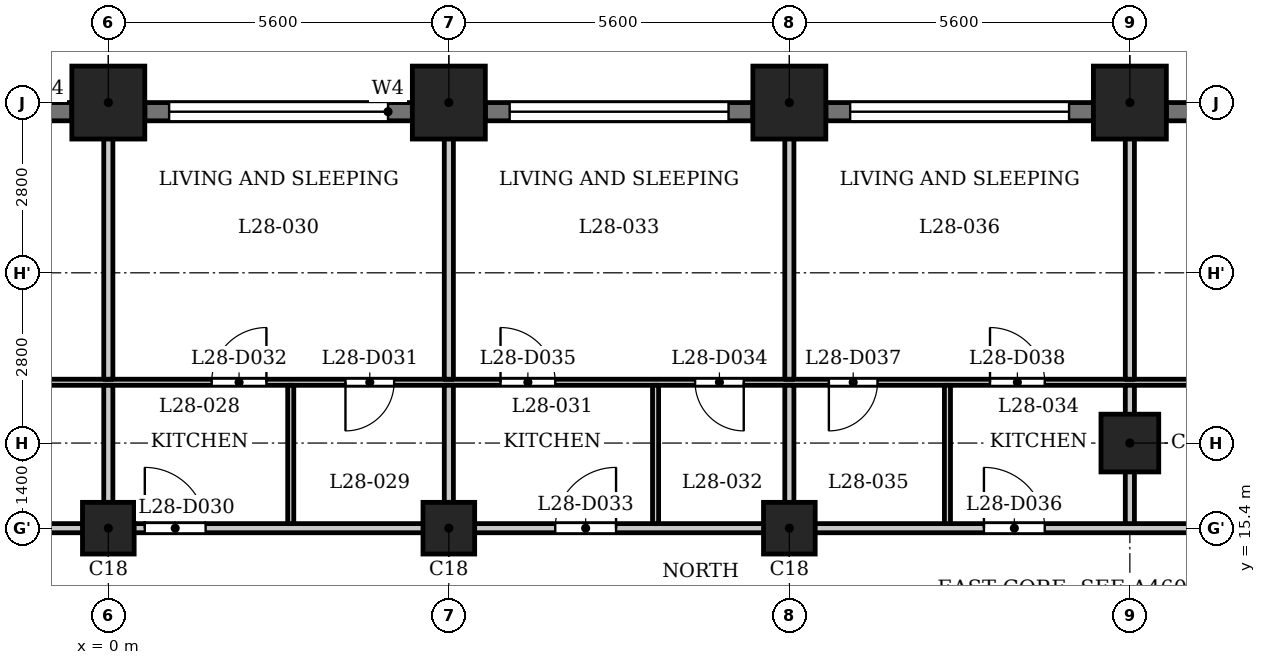
"""IFC4 building model, lengths in metres.
Left out: names, types, materials, properties, quantities, classifications, styles, units other than length and angle.
Written with IfcOpenShell. Run it as: python <this file> out.ifc"""

import sys

from ifc_helpers import new_model, si_unit, direction, frame, frame_2d, origin, origin_2d, place, context, subcontext, project, spatial, rectangle, extrude, element, fill, save


model = new_model("IFC4")
c1 = context("Model", 3, precision=1e-05, world=origin(), true_north=direction((0.0, 1.0)))
c2 = subcontext(c1, "Body", "Model", "MODEL_VIEW")
j1 = project(units=[si_unit("LENGTHUNIT", "METRE"), si_unit("PLANEANGLEUNIT", "RADIAN")], contexts=[c1])
p1 = place(None, origin())
s1 = spatial("IfcSite", under=j1, at=p1, CompositionType="ELEMENT")
p2 = place(p1, origin())
s2 = spatial("IfcBuilding", under=s1, at=p2, CompositionType="ELEMENT")
p3 = place(p2, frame((0.0, 0.0, 111.3)))
s3 = spatial("IfcBuildingStorey", under=s2, at=p3, CompositionType="ELEMENT", Elevation=111.3)
for number, where, z_axis, x_axis in (
    (1, (16.8, 22.4, 0.0), (0.0, 0.0, 1.0), (1.0, 0.0, 0.0)),
    (2, (11.2, 22.4, 0.0), (0.0, 0.0, 1.0), (1.0, 0.0, 0.0)),
    (3, (5.6, 22.4, 0.0), (0.0, 0.0, 1.0), (1.0, 0.0, 0.0)),
    (4, (0.0, 22.4, 0.0), (0.0, 0.0, 1.0), (1.0, 0.0, 0.0)),
):
    element("IfcColumn", number, at=place(p3, frame(where, z_axis=z_axis, x_axis=x_axis)), inside=s3, PredefinedType="COLUMN", context=c2, shape_type="SweptSolid", body=[
        extrude(rectangle(XDim=1.2, YDim=1.2, at=origin_2d()), origin(), (0.0, 0.0, 1.0), 3.5),
    ])
p4 = place(p3, frame((16.8, 16.8, 0.0), z_axis=(0.0, 0.0, 1.0), x_axis=(1.0, 0.0, 0.0)))
e5 = element("IfcColumn", 5, at=p4, inside=s3, PredefinedType="COLUMN", context=c2, shape_type="SweptSolid", body=[
    extrude(rectangle(XDim=0.95, YDim=0.95, at=origin_2d()), origin(), (0.0, 0.0, 1.0), 3.5),
])
for number, where, z_axis, x_axis in (
    (6, (0.0, 15.4, 0.0), (0.0, 0.0, 1.0), (1.0, 0.0, 0.0)),
    (7, (5.6, 15.4, 0.0), (0.0, 0.0, 1.0), (1.0, 0.0, 0.0)),
    (8, (11.2, 15.4, 0.0), (0.0, 0.0, 1.0), (1.0, 0.0, 0.0)),
):
    element("IfcColumn", number, at=place(p3, frame(where, z_axis=z_axis, x_axis=x_axis)), inside=s3, PredefinedType="COLUMN", context=c2, shape_type="SweptSolid", body=[
        extrude(rectangle(XDim=0.85, YDim=0.85, at=origin_2d()), origin(), (0.0, 0.0, 1.0), 3.5),
    ])
p5 = place(p3, frame((20.0, 22.25, 0.0), z_axis=(0.0, 0.0, 1.0), x_axis=(-1.0, 0.0, 0.0)))
e9 = element("IfcWall", 9, at=p5, inside=s3, PredefinedType="SOLIDWALL", context=c2, shape_type="SweptSolid", body=[
    extrude(rectangle(XDim=2.6, YDim=0.3, at=frame_2d((1.3, 0.0))), origin(), (0.0, 0.0, 1.0), 2.4),
])
p6 = place(p5, frame((0.7, 0.0, 0.6)))
e10 = element("IfcOpeningElement", 10, at=p6, cuts=e9, PredefinedType="OPENING", context=c2, shape_type="SweptSolid", body=[
    extrude(rectangle(XDim=1.2, YDim=1.55, at=frame_2d((0.6, 0.775))), frame((0.0, 0.16, 0.0), z_axis=(0.0, -1.0, 0.0), x_axis=(1.0, 0.0, 0.0)), (0.0, 0.0, 1.0), 0.32),
])
p7 = place(p3, frame((16.2, 22.25, 0.0), z_axis=(0.0, 0.0, 1.0), x_axis=(-1.0, 0.0, 0.0)))
e11 = element("IfcWall", 11, at=p7, inside=s3, PredefinedType="SOLIDWALL", context=c2, shape_type="SweptSolid", body=[
    extrude(rectangle(XDim=4.4, YDim=0.3, at=frame_2d((2.2, 0.0))), origin(), (0.0, 0.0, 1.0), 2.4),
])
p8 = place(p7, frame((0.4, 0.0, 1.2)))
e12 = element("IfcOpeningElement", 12, at=p8, cuts=e11, PredefinedType="OPENING", context=c2, shape_type="SweptSolid", body=[
    extrude(rectangle(XDim=3.6, YDim=0.95, at=frame_2d((1.8, 0.475))), frame((0.0, 0.16, 0.0), z_axis=(0.0, -1.0, 0.0), x_axis=(1.0, 0.0, 0.0)), (0.0, 0.0, 1.0), 0.32),
])
p9 = place(p3, frame((10.6, 22.25, 0.0), z_axis=(0.0, 0.0, 1.0), x_axis=(-1.0, 0.0, 0.0)))
e13 = element("IfcWall", 13, at=p9, inside=s3, PredefinedType="SOLIDWALL", context=c2, shape_type="SweptSolid", body=[
    extrude(rectangle(XDim=4.4, YDim=0.3, at=frame_2d((2.2, 0.0))), origin(), (0.0, 0.0, 1.0), 2.4),
])
p10 = place(p9, frame((0.4, 0.0, 1.2)))
e14 = element("IfcOpeningElement", 14, at=p10, cuts=e13, PredefinedType="OPENING", context=c2, shape_type="SweptSolid", body=[
    extrude(rectangle(XDim=3.6, YDim=0.95, at=frame_2d((1.8, 0.475))), frame((0.0, 0.16, 0.0), z_axis=(0.0, -1.0, 0.0), x_axis=(1.0, 0.0, 0.0)), (0.0, 0.0, 1.0), 0.32),
])
p11 = place(p3, frame((5.0, 22.25, 0.0), z_axis=(0.0, 0.0, 1.0), x_axis=(-1.0, 0.0, 0.0)))
e15 = element("IfcWall", 15, at=p11, inside=s3, PredefinedType="SOLIDWALL", context=c2, shape_type="SweptSolid", body=[
    extrude(rectangle(XDim=4.4, YDim=0.3, at=frame_2d((2.2, 0.0))), origin(), (0.0, 0.0, 1.0), 2.4),
])
p12 = place(p11, frame((0.4, 0.0, 1.2)))
e16 = element("IfcOpeningElement", 16, at=p12, cuts=e15, PredefinedType="OPENING", context=c2, shape_type="SweptSolid", body=[
    extrude(rectangle(XDim=3.6, YDim=0.95, at=frame_2d((1.8, 0.475))), frame((0.0, 0.16, 0.0), z_axis=(0.0, -1.0, 0.0), x_axis=(1.0, 0.0, 0.0)), (0.0, 0.0, 1.0), 0.32),
])
p13 = place(p3, frame((-0.6, 22.25, 0.0), z_axis=(0.0, 0.0, 1.0), x_axis=(-1.0, 0.0, 0.0)))
e17 = element("IfcWall", 17, at=p13, inside=s3, PredefinedType="SOLIDWALL", context=c2, shape_type="SweptSolid", body=[
    extrude(rectangle(XDim=4.4, YDim=0.3, at=frame_2d((2.2, 0.0))), origin(), (0.0, 0.0, 1.0), 2.4),
])
p14 = place(p13, frame((0.4, 0.0, 1.2)))
e18 = element("IfcOpeningElement", 18, at=p14, cuts=e17, PredefinedType="OPENING", context=c2, shape_type="SweptSolid", body=[
    extrude(rectangle(XDim=3.6, YDim=0.95, at=frame_2d((1.8, 0.475))), frame((0.0, 0.16, 0.0), z_axis=(0.0, -1.0, 0.0), x_axis=(1.0, 0.0, 0.0)), (0.0, 0.0, 1.0), 0.32),
])
p15 = place(p3, frame((-27.484, 15.4, 0.0), z_axis=(0.0, 0.0, 1.0), x_axis=(1.0, 0.0, 0.0)))
e19 = element("IfcWall", 19, at=p15, inside=s3, PredefinedType="PARTITIONING", context=c2, shape_type="SweptSolid", body=[
    extrude(rectangle(XDim=54.968, YDim=0.15, at=frame_2d((27.484, 0.0))), origin(), (0.0, 0.0, 1.0), 3.2),
])
p16 = place(p15, frame((9.034, 0.0, 0.0)))
e20 = element("IfcOpeningElement", 20, at=p16, cuts=e19, PredefinedType="OPENING", context=c2, shape_type="SweptSolid", body=[
    extrude(rectangle(XDim=1.0, YDim=2.1, at=frame_2d((0.5, 1.05))), frame((0.0, 0.085, 0.0), z_axis=(0.0, -1.0, 0.0), x_axis=(1.0, 0.0, 0.0)), (0.0, 0.0, 1.0), 0.17),
])
p17 = place(p15, frame((14.634, 0.0, 0.0)))
e21 = element("IfcOpeningElement", 21, at=p17, cuts=e19, PredefinedType="OPENING", context=c2, shape_type="SweptSolid", body=[
    extrude(rectangle(XDim=1.0, YDim=2.1, at=frame_2d((0.5, 1.05))), frame((0.0, 0.085, 0.0), z_axis=(0.0, -1.0, 0.0), x_axis=(1.0, 0.0, 0.0)), (0.0, 0.0, 1.0), 0.17),
])
p18 = place(p15, frame((16.984, 0.0, 0.0)))
e22 = element("IfcOpeningElement", 22, at=p18, cuts=e19, PredefinedType="OPENING", context=c2, shape_type="SweptSolid", body=[
    extrude(rectangle(XDim=1.0, YDim=2.1, at=frame_2d((0.5, 1.05))), frame((0.0, 0.085, 0.0), z_axis=(0.0, -1.0, 0.0), x_axis=(1.0, 0.0, 0.0)), (0.0, 0.0, 1.0), 0.17),
])
p19 = place(p15, frame((28.084, 0.0, 0.0)))
e23 = element("IfcOpeningElement", 23, at=p19, cuts=e19, PredefinedType="OPENING", context=c2, shape_type="SweptSolid", body=[
    extrude(rectangle(XDim=1.0, YDim=2.1, at=frame_2d((0.5, 1.05))), frame((0.0, 0.085, 0.0), z_axis=(0.0, -1.0, 0.0), x_axis=(1.0, 0.0, 0.0)), (0.0, 0.0, 1.0), 0.17),
])
p20 = place(p15, frame((34.834, 0.0, 0.0)))
e24 = element("IfcOpeningElement", 24, at=p20, cuts=e19, PredefinedType="OPENING", context=c2, shape_type="SweptSolid", body=[
    extrude(rectangle(XDim=1.0, YDim=2.1, at=frame_2d((0.5, 1.05))), frame((0.0, 0.085, 0.0), z_axis=(0.0, -1.0, 0.0), x_axis=(1.0, 0.0, 0.0)), (0.0, 0.0, 1.0), 0.17),
])
p21 = place(p15, frame((41.884, 0.0, 0.0)))
e25 = element("IfcOpeningElement", 25, at=p21, cuts=e19, PredefinedType="OPENING", context=c2, shape_type="SweptSolid", body=[
    extrude(rectangle(XDim=1.0, YDim=2.1, at=frame_2d((0.5, 1.05))), frame((0.0, 0.085, 0.0), z_axis=(0.0, -1.0, 0.0), x_axis=(1.0, 0.0, 0.0)), (0.0, 0.0, 1.0), 0.17),
])
p22 = place(p15, frame((48.234, 0.0, 0.0)))
e26 = element("IfcOpeningElement", 26, at=p22, cuts=e19, PredefinedType="OPENING", context=c2, shape_type="SweptSolid", body=[
    extrude(rectangle(XDim=1.0, YDim=2.1, at=frame_2d((0.5, 1.05))), frame((0.0, 0.085, 0.0), z_axis=(0.0, -1.0, 0.0), x_axis=(1.0, 0.0, 0.0)), (0.0, 0.0, 1.0), 0.17),
])
p23 = place(p3, frame((-26.465, 17.8, 0.0), z_axis=(0.0, 0.0, 1.0), x_axis=(1.0, 0.0, 0.0)))
e27 = element("IfcWall", 27, at=p23, inside=s3, PredefinedType="PARTITIONING", context=c2, shape_type="SweptSolid", body=[
    extrude(rectangle(XDim=52.859, YDim=0.1, at=frame_2d((26.43, 0.0))), origin(), (0.0, 0.0, 1.0), 3.2),
])
p24 = place(p23, frame((2.697, 0.0, 0.0)))
e28 = element("IfcOpeningElement", 28, at=p24, cuts=e27, PredefinedType="OPENING", context=c2, shape_type="SweptSolid", body=[
    extrude(rectangle(XDim=0.8, YDim=2.1, at=frame_2d((0.4, 1.05))), frame((0.0, 0.06, 0.0), z_axis=(0.0, -1.0, 0.0), x_axis=(1.0, 0.0, 0.0)), (0.0, 0.0, 1.0), 0.12),
])
p25 = place(p23, frame((7.115, 0.0, 0.0)))
e29 = element("IfcOpeningElement", 29, at=p25, cuts=e27, PredefinedType="OPENING", context=c2, shape_type="SweptSolid", body=[
    extrude(rectangle(XDim=0.9, YDim=2.1, at=frame_2d((0.45, 1.05))), frame((0.0, 0.06, 0.0), z_axis=(0.0, -1.0, 0.0), x_axis=(1.0, 0.0, 0.0)), (0.0, 0.0, 1.0), 0.12),
])
p26 = place(p23, frame((10.315, 0.0, 0.0)))
e30 = element("IfcOpeningElement", 30, at=p26, cuts=e27, PredefinedType="OPENING", context=c2, shape_type="SweptSolid", body=[
    extrude(rectangle(XDim=0.8, YDim=2.1, at=frame_2d((0.4, 1.05))), frame((0.0, 0.06, 0.0), z_axis=(0.0, -1.0, 0.0), x_axis=(1.0, 0.0, 0.0)), (0.0, 0.0, 1.0), 0.12),
])
p27 = place(p23, frame((12.715, 0.0, 0.0)))
e31 = element("IfcOpeningElement", 31, at=p27, cuts=e27, PredefinedType="OPENING", context=c2, shape_type="SweptSolid", body=[
    extrude(rectangle(XDim=0.9, YDim=2.1, at=frame_2d((0.45, 1.05))), frame((0.0, 0.06, 0.0), z_axis=(0.0, -1.0, 0.0), x_axis=(1.0, 0.0, 0.0)), (0.0, 0.0, 1.0), 0.12),
])
p28 = place(p23, frame((21.515, 0.0, 0.0)))
e32 = element("IfcOpeningElement", 32, at=p28, cuts=e27, PredefinedType="OPENING", context=c2, shape_type="SweptSolid", body=[
    extrude(rectangle(XDim=0.8, YDim=2.1, at=frame_2d((0.4, 1.05))), frame((0.0, 0.06, 0.0), z_axis=(0.0, -1.0, 0.0), x_axis=(1.0, 0.0, 0.0)), (0.0, 0.0, 1.0), 0.12),
])
p29 = place(p23, frame((17.065, 0.0, 0.0)))
e33 = element("IfcOpeningElement", 33, at=p29, cuts=e27, PredefinedType="OPENING", context=c2, shape_type="SweptSolid", body=[
    extrude(rectangle(XDim=0.9, YDim=2.1, at=frame_2d((0.45, 1.05))), frame((0.0, 0.06, 0.0), z_axis=(0.0, -1.0, 0.0), x_axis=(1.0, 0.0, 0.0)), (0.0, 0.0, 1.0), 0.12),
])
p30 = place(p23, frame((30.365, 0.0, 0.0)))
e34 = element("IfcOpeningElement", 34, at=p30, cuts=e27, PredefinedType="OPENING", context=c2, shape_type="SweptSolid", body=[
    extrude(rectangle(XDim=0.8, YDim=2.1, at=frame_2d((0.4, 1.05))), frame((0.0, 0.06, 0.0), z_axis=(0.0, -1.0, 0.0), x_axis=(1.0, 0.0, 0.0)), (0.0, 0.0, 1.0), 0.12),
])
p31 = place(p23, frame((28.165, 0.0, 0.0)))
e35 = element("IfcOpeningElement", 35, at=p31, cuts=e27, PredefinedType="OPENING", context=c2, shape_type="SweptSolid", body=[
    extrude(rectangle(XDim=0.9, YDim=2.1, at=frame_2d((0.45, 1.05))), frame((0.0, 0.06, 0.0), z_axis=(0.0, -1.0, 0.0), x_axis=(1.0, 0.0, 0.0)), (0.0, 0.0, 1.0), 0.12),
])
p32 = place(p23, frame((36.115, 0.0, 0.0)))
e36 = element("IfcOpeningElement", 36, at=p32, cuts=e27, PredefinedType="OPENING", context=c2, shape_type="SweptSolid", body=[
    extrude(rectangle(XDim=0.8, YDim=2.1, at=frame_2d((0.4, 1.05))), frame((0.0, 0.06, 0.0), z_axis=(0.0, -1.0, 0.0), x_axis=(1.0, 0.0, 0.0)), (0.0, 0.0, 1.0), 0.12),
])
p33 = place(p23, frame((32.915, 0.0, 0.0)))
e37 = element("IfcOpeningElement", 37, at=p33, cuts=e27, PredefinedType="OPENING", context=c2, shape_type="SweptSolid", body=[
    extrude(rectangle(XDim=0.9, YDim=2.1, at=frame_2d((0.45, 1.05))), frame((0.0, 0.06, 0.0), z_axis=(0.0, -1.0, 0.0), x_axis=(1.0, 0.0, 0.0)), (0.0, 0.0, 1.0), 0.12),
])
p34 = place(p23, frame((38.315, 0.0, 0.0)))
e38 = element("IfcOpeningElement", 38, at=p34, cuts=e27, PredefinedType="OPENING", context=c2, shape_type="SweptSolid", body=[
    extrude(rectangle(XDim=0.8, YDim=2.1, at=frame_2d((0.4, 1.05))), frame((0.0, 0.06, 0.0), z_axis=(0.0, -1.0, 0.0), x_axis=(1.0, 0.0, 0.0)), (0.0, 0.0, 1.0), 0.12),
])
p35 = place(p23, frame((40.965, 0.0, 0.0)))
e39 = element("IfcOpeningElement", 39, at=p35, cuts=e27, PredefinedType="OPENING", context=c2, shape_type="SweptSolid", body=[
    extrude(rectangle(XDim=0.9, YDim=2.1, at=frame_2d((0.45, 1.05))), frame((0.0, 0.06, 0.0), z_axis=(0.0, -1.0, 0.0), x_axis=(1.0, 0.0, 0.0)), (0.0, 0.0, 1.0), 0.12),
])
p36 = place(p23, frame((51.265, 0.0, 0.0)))
e40 = element("IfcOpeningElement", 40, at=p36, cuts=e27, PredefinedType="OPENING", context=c2, shape_type="SweptSolid", body=[
    extrude(rectangle(XDim=0.8, YDim=2.1, at=frame_2d((0.4, 1.05))), frame((0.0, 0.06, 0.0), z_axis=(0.0, -1.0, 0.0), x_axis=(1.0, 0.0, 0.0)), (0.0, 0.0, 1.0), 0.12),
])
p37 = place(p23, frame((46.315, 0.0, 0.0)))
e41 = element("IfcOpeningElement", 41, at=p37, cuts=e27, PredefinedType="OPENING", context=c2, shape_type="SweptSolid", body=[
    extrude(rectangle(XDim=0.9, YDim=2.1, at=frame_2d((0.45, 1.05))), frame((0.0, 0.06, 0.0), z_axis=(0.0, -1.0, 0.0), x_axis=(1.0, 0.0, 0.0)), (0.0, 0.0, 1.0), 0.12),
])
p38 = place(p3, frame((0.0, 15.475, 0.0), z_axis=(0.0, 0.0, 1.0), x_axis=(0.0, 1.0, 0.0)))
e42 = element("IfcWall", 42, at=p38, inside=s3, PredefinedType="PARTITIONING", context=c2, shape_type="SweptSolid", body=[
    extrude(rectangle(XDim=2.275, YDim=0.15, at=frame_2d((1.137, 0.0))), origin(), (0.0, 0.0, 1.0), 3.2),
])
p39 = place(p3, frame((0.0, 17.85, 0.0), z_axis=(0.0, 0.0, 1.0), x_axis=(0.0, 1.0, 0.0)))
e43 = element("IfcWall", 43, at=p39, inside=s3, PredefinedType="PARTITIONING", context=c2, shape_type="SweptSolid", body=[
    extrude(rectangle(XDim=5.13, YDim=0.15, at=frame_2d((2.565, 0.0))), origin(), (0.0, 0.0, 1.0), 3.2),
])
p40 = place(p3, frame((3.0, 15.475, 0.0), z_axis=(0.0, 0.0, 1.0), x_axis=(0.0, 1.0, 0.0)))
e44 = element("IfcWall", 44, at=p40, inside=s3, PredefinedType="PARTITIONING", context=c2, shape_type="SweptSolid", body=[
    extrude(rectangle(XDim=2.275, YDim=0.1, at=frame_2d((1.137, 0.0))), origin(), (0.0, 0.0, 1.0), 3.2),
])
p41 = place(p3, frame((5.6, 15.475, 0.0), z_axis=(0.0, 0.0, 1.0), x_axis=(0.0, 1.0, 0.0)))
e45 = element("IfcWall", 45, at=p41, inside=s3, PredefinedType="PARTITIONING", context=c2, shape_type="SweptSolid", body=[
    extrude(rectangle(XDim=2.275, YDim=0.15, at=frame_2d((1.137, 0.0))), origin(), (0.0, 0.0, 1.0), 3.2),
])
p42 = place(p3, frame((5.6, 17.85, 0.0), z_axis=(0.0, 0.0, 1.0), x_axis=(0.0, 1.0, 0.0)))
e46 = element("IfcWall", 46, at=p42, inside=s3, PredefinedType="PARTITIONING", context=c2, shape_type="SweptSolid", body=[
    extrude(rectangle(XDim=5.13, YDim=0.15, at=frame_2d((2.565, 0.0))), origin(), (0.0, 0.0, 1.0), 3.2),
])
p43 = place(p3, frame((9.0, 15.475, 0.0), z_axis=(0.0, 0.0, 1.0), x_axis=(0.0, 1.0, 0.0)))
e47 = element("IfcWall", 47, at=p43, inside=s3, PredefinedType="PARTITIONING", context=c2, shape_type="SweptSolid", body=[
    extrude(rectangle(XDim=2.275, YDim=0.1, at=frame_2d((1.137, 0.0))), origin(), (0.0, 0.0, 1.0), 3.2),
])
p44 = place(p3, frame((11.2, 15.475, 0.0), z_axis=(0.0, 0.0, 1.0), x_axis=(0.0, 1.0, 0.0)))
e48 = element("IfcWall", 48, at=p44, inside=s3, PredefinedType="PARTITIONING", context=c2, shape_type="SweptSolid", body=[
    extrude(rectangle(XDim=2.275, YDim=0.15, at=frame_2d((1.137, 0.0))), origin(), (0.0, 0.0, 1.0), 3.2),
])
p45 = place(p3, frame((11.2, 17.85, 0.0), z_axis=(0.0, 0.0, 1.0), x_axis=(0.0, 1.0, 0.0)))
e49 = element("IfcWall", 49, at=p45, inside=s3, PredefinedType="PARTITIONING", context=c2, shape_type="SweptSolid", body=[
    extrude(rectangle(XDim=5.13, YDim=0.15, at=frame_2d((2.565, 0.0))), origin(), (0.0, 0.0, 1.0), 3.2),
])
p46 = place(p3, frame((13.8, 15.475, 0.0), z_axis=(0.0, 0.0, 1.0), x_axis=(0.0, 1.0, 0.0)))
e50 = element("IfcWall", 50, at=p46, inside=s3, PredefinedType="PARTITIONING", context=c2, shape_type="SweptSolid", body=[
    extrude(rectangle(XDim=2.275, YDim=0.1, at=frame_2d((1.137, 0.0))), origin(), (0.0, 0.0, 1.0), 3.2),
])
p47 = place(p3, frame((16.8, 15.475, 0.0), z_axis=(0.0, 0.0, 1.0), x_axis=(0.0, 1.0, 0.0)))
e51 = element("IfcWall", 51, at=p47, inside=s3, PredefinedType="PARTITIONING", context=c2, shape_type="SweptSolid", body=[
    extrude(rectangle(XDim=2.275, YDim=0.15, at=frame_2d((1.137, 0.0))), origin(), (0.0, 0.0, 1.0), 3.2),
])
p48 = place(p3, frame((16.8, 17.85, 0.0), z_axis=(0.0, 0.0, 1.0), x_axis=(0.0, 1.0, 0.0)))
e52 = element("IfcWall", 52, at=p48, inside=s3, PredefinedType="PARTITIONING", context=c2, shape_type="SweptSolid", body=[
    extrude(rectangle(XDim=5.13, YDim=0.15, at=frame_2d((2.565, 0.0))), origin(), (0.0, 0.0, 1.0), 3.2),
])
p49 = place(p19, origin())
e53 = element("IfcDoor", 53, at=p49, inside=s3, OperationType="SINGLE_SWING_RIGHT", PredefinedType="DOOR", context=c2, shape_type="SweptSolid", body=[
    extrude(rectangle(XDim=1.0, YDim=2.1, at=frame_2d((0.5, 1.05))), frame((0.0, 0.025, 0.0), z_axis=(0.0, -1.0, 0.0), x_axis=(1.0, 0.0, 0.0)), (0.0, 0.0, 1.0), 0.05),
])
fill(e23, e53)
p50 = place(p30, origin())
e54 = element("IfcDoor", 54, at=p50, inside=s3, OperationType="SINGLE_SWING_LEFT", PredefinedType="DOOR", context=c2, shape_type="SweptSolid", body=[
    extrude(rectangle(XDim=0.8, YDim=2.1, at=frame_2d((0.4, 1.05))), frame((0.0, 0.025, 0.0), z_axis=(0.0, -1.0, 0.0), x_axis=(1.0, 0.0, 0.0)), (0.0, 0.0, 1.0), 0.05),
])
fill(e34, e54)
p51 = place(p31, origin())
e55 = element("IfcDoor", 55, at=p51, inside=s3, OperationType="SINGLE_SWING_LEFT", PredefinedType="DOOR", context=c2, shape_type="SweptSolid", body=[
    extrude(rectangle(XDim=0.9, YDim=2.1, at=frame_2d((0.45, 1.05))), frame((0.0, 0.025, 0.0), z_axis=(0.0, -1.0, 0.0), x_axis=(1.0, 0.0, 0.0)), (0.0, 0.0, 1.0), 0.05),
])
fill(e35, e55)
p52 = place(p20, origin())
e56 = element("IfcDoor", 56, at=p52, inside=s3, OperationType="SINGLE_SWING_LEFT", PredefinedType="DOOR", context=c2, shape_type="SweptSolid", body=[
    extrude(rectangle(XDim=1.0, YDim=2.1, at=frame_2d((0.5, 1.05))), frame((0.0, 0.025, 0.0), z_axis=(0.0, -1.0, 0.0), x_axis=(1.0, 0.0, 0.0)), (0.0, 0.0, 1.0), 0.05),
])
fill(e24, e56)
p53 = place(p32, origin())
e57 = element("IfcDoor", 57, at=p53, inside=s3, OperationType="SINGLE_SWING_RIGHT", PredefinedType="DOOR", context=c2, shape_type="SweptSolid", body=[
    extrude(rectangle(XDim=0.8, YDim=2.1, at=frame_2d((0.4, 1.05))), frame((0.0, 0.025, 0.0), z_axis=(0.0, -1.0, 0.0), x_axis=(1.0, 0.0, 0.0)), (0.0, 0.0, 1.0), 0.05),
])
fill(e36, e57)
p54 = place(p33, origin())
e58 = element("IfcDoor", 58, at=p54, inside=s3, OperationType="SINGLE_SWING_RIGHT", PredefinedType="DOOR", context=c2, shape_type="SweptSolid", body=[
    extrude(rectangle(XDim=0.9, YDim=2.1, at=frame_2d((0.45, 1.05))), frame((0.0, 0.025, 0.0), z_axis=(0.0, -1.0, 0.0), x_axis=(1.0, 0.0, 0.0)), (0.0, 0.0, 1.0), 0.05),
])
fill(e37, e58)
p55 = place(p21, origin())
e59 = element("IfcDoor", 59, at=p55, inside=s3, OperationType="SINGLE_SWING_RIGHT", PredefinedType="DOOR", context=c2, shape_type="SweptSolid", body=[
    extrude(rectangle(XDim=1.0, YDim=2.1, at=frame_2d((0.5, 1.05))), frame((0.0, 0.025, 0.0), z_axis=(0.0, -1.0, 0.0), x_axis=(1.0, 0.0, 0.0)), (0.0, 0.0, 1.0), 0.05),
])
fill(e25, e59)
p56 = place(p34, origin())
e60 = element("IfcDoor", 60, at=p56, inside=s3, OperationType="SINGLE_SWING_LEFT", PredefinedType="DOOR", context=c2, shape_type="SweptSolid", body=[
    extrude(rectangle(XDim=0.8, YDim=2.1, at=frame_2d((0.4, 1.05))), frame((0.0, 0.025, 0.0), z_axis=(0.0, -1.0, 0.0), x_axis=(1.0, 0.0, 0.0)), (0.0, 0.0, 1.0), 0.05),
])
fill(e38, e60)
p57 = place(p35, origin())
e61 = element("IfcDoor", 61, at=p57, inside=s3, OperationType="SINGLE_SWING_RIGHT", PredefinedType="DOOR", context=c2, shape_type="SweptSolid", body=[
    extrude(rectangle(XDim=0.9, YDim=2.1, at=frame_2d((0.45, 1.05))), frame((0.0, 0.025, 0.0), z_axis=(0.0, -1.0, 0.0), x_axis=(1.0, 0.0, 0.0)), (0.0, 0.0, 1.0), 0.05),
])
fill(e39, e61)
p58 = place(p8, origin())
e62 = element("IfcWindow", 62, at=p58, inside=s3, PartitioningType="SINGLE_PANEL", PredefinedType="WINDOW", context=c2, shape_type="SweptSolid", body=[
    extrude(rectangle(XDim=3.6, YDim=0.95, at=frame_2d((1.8, 0.475))), frame((0.0, 0.03, 0.0), z_axis=(0.0, -1.0, 0.0), x_axis=(1.0, 0.0, 0.0)), (0.0, 0.0, 1.0), 0.06),
])
fill(e12, e62)
p59 = place(p10, origin())
e63 = element("IfcWindow", 63, at=p59, inside=s3, PartitioningType="SINGLE_PANEL", PredefinedType="WINDOW", context=c2, shape_type="SweptSolid", body=[
    extrude(rectangle(XDim=3.6, YDim=0.95, at=frame_2d((1.8, 0.475))), frame((0.0, 0.03, 0.0), z_axis=(0.0, -1.0, 0.0), x_axis=(1.0, 0.0, 0.0)), (0.0, 0.0, 1.0), 0.06),
])
fill(e14, e63)
p60 = place(p12, origin())
e64 = element("IfcWindow", 64, at=p60, inside=s3, PartitioningType="SINGLE_PANEL", PredefinedType="WINDOW", context=c2, shape_type="SweptSolid", body=[
    extrude(rectangle(XDim=3.6, YDim=0.95, at=frame_2d((1.8, 0.475))), frame((0.0, 0.03, 0.0), z_axis=(0.0, -1.0, 0.0), x_axis=(1.0, 0.0, 0.0)), (0.0, 0.0, 1.0), 0.06),
])
fill(e16, e64)
save(model, sys.argv[1])
